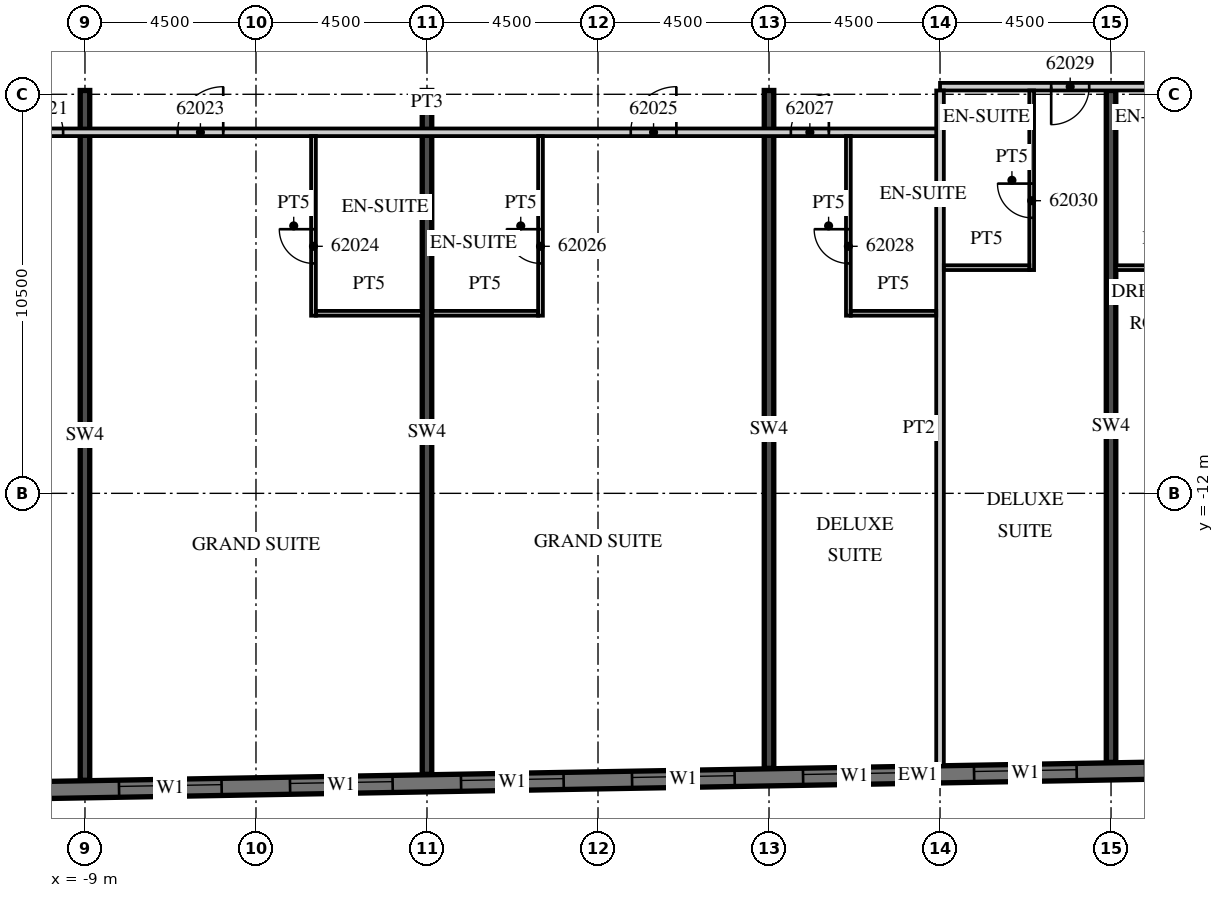
"""IFC4 building model, lengths in metres.
Left out: names, types, materials, properties, quantities, classifications, styles, units other than length and angle.
Written with IfcOpenShell. Run it as: python <this file> out.ifc"""

import sys

from ifc_helpers import new_model, si_unit, direction, frame, frame_2d, origin, place, context, subcontext, project, spatial, rectangle, extrude, element, fill, save


model = new_model("IFC4")
c1 = context("Model", 3, precision=1e-05, world=origin(), true_north=direction((0.0, 1.0)))
c2 = subcontext(c1, "Body", "Model", "MODEL_VIEW")
j1 = project(units=[si_unit("LENGTHUNIT", "METRE"), si_unit("PLANEANGLEUNIT", "RADIAN")], contexts=[c1])
p1 = place(None, origin())
s1 = spatial("IfcSite", under=j1, at=p1, CompositionType="ELEMENT")
p2 = place(p1, origin())
s2 = spatial("IfcBuilding", under=s1, at=p2, CompositionType="ELEMENT")
p3 = place(p2, frame((0.0, 0.0, 250.7)))
s3 = spatial("IfcBuildingStorey", under=s2, at=p3, CompositionType="ELEMENT", Elevation=250.7)
p4 = place(p3, frame((-9.0, -19.55, 0.0), z_axis=(0.0, 0.0, 1.0), x_axis=(0.0, 1.0, 0.0)))
e1 = element("IfcWall", 1, at=p4, inside=s3, PredefinedType="SHEAR", context=c2, shape_type="SweptSolid", body=[
    extrude(rectangle(XDim=18.15, YDim=0.25, at=frame_2d((9.075, 0.0))), origin(), (0.0, 0.0, 1.0), 3.3),
])
p5 = place(p3, frame((0.0, -19.393, 0.0), z_axis=(0.0, 0.0, 1.0), x_axis=(0.0, 1.0, 0.0)))
e2 = element("IfcWall", 2, at=p5, inside=s3, PredefinedType="SHEAR", context=c2, shape_type="SweptSolid", body=[
    extrude(rectangle(XDim=17.993, YDim=0.25, at=frame_2d((8.997, 0.0))), origin(), (0.0, 0.0, 1.0), 3.3),
])
p6 = place(p3, frame((9.0, -19.236, 0.0), z_axis=(0.0, 0.0, 1.0), x_axis=(0.0, 1.0, 0.0)))
e3 = element("IfcWall", 3, at=p6, inside=s3, PredefinedType="SHEAR", context=c2, shape_type="SweptSolid", body=[
    extrude(rectangle(XDim=17.836, YDim=0.25, at=frame_2d((8.918, 0.0))), origin(), (0.0, 0.0, 1.0), 3.3),
])
p7 = place(p3, frame((18.0, -19.079, 0.0), z_axis=(0.0, 0.0, 1.0), x_axis=(0.0, 1.0, 0.0)))
e4 = element("IfcWall", 4, at=p7, inside=s3, PredefinedType="SHEAR", context=c2, shape_type="SweptSolid", body=[
    extrude(rectangle(XDim=17.679, YDim=0.25, at=frame_2d((8.84, 0.0))), origin(), (0.0, 0.0, 1.0), 3.3),
])
p8 = place(p3, frame((-13.504, -19.866, 0.0), z_axis=(0.0, 0.0, 1.0), x_axis=(0.999847672978, 0.017453676992, 0.0)))
e5 = element("IfcWall", 5, at=p8, inside=s3, PredefinedType="SOLIDWALL", context=c2, shape_type="SweptSolid", body=[
    extrude(rectangle(XDim=52.86, YDim=0.45, at=frame_2d((26.43, 0.0))), origin(), (0.0, 0.0, 1.0), 3.02),
])
p9 = place(p8, frame((0.9, 0.0, 0.45)))
e6 = element("IfcOpeningElement", 6, at=p9, cuts=e5, PredefinedType="OPENING", context=c2, shape_type="SweptSolid", body=[
    extrude(rectangle(XDim=2.7, YDim=2.25, at=frame_2d((1.35, 1.125))), frame((0.0, 0.235, 0.0), z_axis=(0.0, -1.0, 0.0), x_axis=(1.0, 0.0, 0.0)), (0.0, 0.0, 1.0), 0.47),
])
p10 = place(p8, frame((5.401, 0.0, 0.45)))
e7 = element("IfcOpeningElement", 7, at=p10, cuts=e5, PredefinedType="OPENING", context=c2, shape_type="SweptSolid", body=[
    extrude(rectangle(XDim=2.7, YDim=2.25, at=frame_2d((1.35, 1.125))), frame((0.0, 0.235, 0.0), z_axis=(0.0, -1.0, 0.0), x_axis=(1.0, 0.0, 0.0)), (0.0, 0.0, 1.0), 0.47),
])
p11 = place(p8, frame((9.902, 0.0, 0.45)))
e8 = element("IfcOpeningElement", 8, at=p11, cuts=e5, PredefinedType="OPENING", context=c2, shape_type="SweptSolid", body=[
    extrude(rectangle(XDim=2.7, YDim=2.25, at=frame_2d((1.35, 1.125))), frame((0.0, 0.235, 0.0), z_axis=(0.0, -1.0, 0.0), x_axis=(1.0, 0.0, 0.0)), (0.0, 0.0, 1.0), 0.47),
])
p12 = place(p8, frame((14.402, 0.0, 0.45)))
e9 = element("IfcOpeningElement", 9, at=p12, cuts=e5, PredefinedType="OPENING", context=c2, shape_type="SweptSolid", body=[
    extrude(rectangle(XDim=2.7, YDim=2.25, at=frame_2d((1.35, 1.125))), frame((0.0, 0.235, 0.0), z_axis=(0.0, -1.0, 0.0), x_axis=(1.0, 0.0, 0.0)), (0.0, 0.0, 1.0), 0.47),
])
p13 = place(p8, frame((18.903, 0.0, 0.45)))
e10 = element("IfcOpeningElement", 10, at=p13, cuts=e5, PredefinedType="OPENING", context=c2, shape_type="SweptSolid", body=[
    extrude(rectangle(XDim=2.7, YDim=2.25, at=frame_2d((1.35, 1.125))), frame((0.0, 0.235, 0.0), z_axis=(0.0, -1.0, 0.0), x_axis=(1.0, 0.0, 0.0)), (0.0, 0.0, 1.0), 0.47),
])
p14 = place(p8, frame((23.404, 0.0, 0.45)))
e11 = element("IfcOpeningElement", 11, at=p14, cuts=e5, PredefinedType="OPENING", context=c2, shape_type="SweptSolid", body=[
    extrude(rectangle(XDim=2.7, YDim=2.25, at=frame_2d((1.35, 1.125))), frame((0.0, 0.235, 0.0), z_axis=(0.0, -1.0, 0.0), x_axis=(1.0, 0.0, 0.0)), (0.0, 0.0, 1.0), 0.47),
])
p15 = place(p8, frame((27.904, 0.0, 0.45)))
e12 = element("IfcOpeningElement", 12, at=p15, cuts=e5, PredefinedType="OPENING", context=c2, shape_type="SweptSolid", body=[
    extrude(rectangle(XDim=2.7, YDim=2.25, at=frame_2d((1.35, 1.125))), frame((0.0, 0.235, 0.0), z_axis=(0.0, -1.0, 0.0), x_axis=(1.0, 0.0, 0.0)), (0.0, 0.0, 1.0), 0.47),
])
p16 = place(p8, frame((32.405, 0.0, 0.45)))
e13 = element("IfcOpeningElement", 13, at=p16, cuts=e5, PredefinedType="OPENING", context=c2, shape_type="SweptSolid", body=[
    extrude(rectangle(XDim=2.7, YDim=2.25, at=frame_2d((1.35, 1.125))), frame((0.0, 0.235, 0.0), z_axis=(0.0, -1.0, 0.0), x_axis=(1.0, 0.0, 0.0)), (0.0, 0.0, 1.0), 0.47),
])
p17 = place(p8, frame((36.906, 0.0, 0.45)))
e14 = element("IfcOpeningElement", 14, at=p17, cuts=e5, PredefinedType="OPENING", context=c2, shape_type="SweptSolid", body=[
    extrude(rectangle(XDim=2.7, YDim=2.25, at=frame_2d((1.35, 1.125))), frame((0.0, 0.235, 0.0), z_axis=(0.0, -1.0, 0.0), x_axis=(1.0, 0.0, 0.0)), (0.0, 0.0, 1.0), 0.47),
])
p18 = place(p8, frame((41.406, 0.0, 0.45)))
e15 = element("IfcOpeningElement", 15, at=p18, cuts=e5, PredefinedType="OPENING", context=c2, shape_type="SweptSolid", body=[
    extrude(rectangle(XDim=2.7, YDim=2.25, at=frame_2d((1.35, 1.125))), frame((0.0, 0.235, 0.0), z_axis=(0.0, -1.0, 0.0), x_axis=(1.0, 0.0, 0.0)), (0.0, 0.0, 1.0), 0.47),
])
p19 = place(p8, frame((45.907, 0.0, 0.45)))
e16 = element("IfcOpeningElement", 16, at=p19, cuts=e5, PredefinedType="OPENING", context=c2, shape_type="SweptSolid", body=[
    extrude(rectangle(XDim=2.7, YDim=2.25, at=frame_2d((1.35, 1.125))), frame((0.0, 0.235, 0.0), z_axis=(0.0, -1.0, 0.0), x_axis=(1.0, 0.0, 0.0)), (0.0, 0.0, 1.0), 0.47),
])
p20 = place(p3, frame((-13.5, -2.5, 0.0), z_axis=(0.0, 0.0, 1.0), x_axis=(1.0, 0.0, 0.0)))
e17 = element("IfcWall", 17, at=p20, inside=s3, PredefinedType="PARTITIONING", context=c2, shape_type="SweptSolid", body=[
    extrude(rectangle(XDim=27.0, YDim=0.2, at=frame_2d((13.5, 0.0))), origin(), (0.0, 0.0, 1.0), 3.02),
])
p21 = place(p20, frame((2.925, 0.0, 0.0)))
e18 = element("IfcOpeningElement", 18, at=p21, cuts=e17, PredefinedType="OPENING", context=c2, shape_type="SweptSolid", body=[
    extrude(rectangle(XDim=1.0, YDim=2.1, at=frame_2d((0.5, 1.05))), frame((0.0, 0.11, 0.0), z_axis=(0.0, -1.0, 0.0), x_axis=(1.0, 0.0, 0.0)), (0.0, 0.0, 1.0), 0.22),
])
p22 = place(p20, frame((6.938, 0.0, 0.0)))
e19 = element("IfcOpeningElement", 19, at=p22, cuts=e17, PredefinedType="OPENING", context=c2, shape_type="SweptSolid", body=[
    extrude(rectangle(XDim=1.2, YDim=2.1, at=frame_2d((0.6, 1.05))), frame((0.0, 0.11, 0.0), z_axis=(0.0, -1.0, 0.0), x_axis=(1.0, 0.0, 0.0)), (0.0, 0.0, 1.0), 0.22),
])
p23 = place(p20, frame((18.862, 0.0, 0.0)))
e20 = element("IfcOpeningElement", 20, at=p23, cuts=e17, PredefinedType="OPENING", context=c2, shape_type="SweptSolid", body=[
    extrude(rectangle(XDim=1.2, YDim=2.1, at=frame_2d((0.6, 1.05))), frame((0.0, 0.11, 0.0), z_axis=(0.0, -1.0, 0.0), x_axis=(1.0, 0.0, 0.0)), (0.0, 0.0, 1.0), 0.22),
])
p24 = place(p20, frame((23.075, 0.0, 0.0)))
e21 = element("IfcOpeningElement", 21, at=p24, cuts=e17, PredefinedType="OPENING", context=c2, shape_type="SweptSolid", body=[
    extrude(rectangle(XDim=1.0, YDim=2.1, at=frame_2d((0.5, 1.05))), frame((0.0, 0.11, 0.0), z_axis=(0.0, -1.0, 0.0), x_axis=(1.0, 0.0, 0.0)), (0.0, 0.0, 1.0), 0.22),
])
p25 = place(p3, frame((13.5, -1.3, 0.0), z_axis=(0.0, 0.0, 1.0), x_axis=(1.0, 0.0, 0.0)))
e22 = element("IfcWall", 22, at=p25, inside=s3, PredefinedType="PARTITIONING", context=c2, shape_type="SweptSolid", body=[
    extrude(rectangle(XDim=29.091, YDim=0.2, at=frame_2d((14.545, 0.0))), origin(), (0.0, 0.0, 1.0), 3.02),
])
p26 = place(p25, frame((2.925, 0.0, 0.0)))
e23 = element("IfcOpeningElement", 23, at=p26, cuts=e22, PredefinedType="OPENING", context=c2, shape_type="SweptSolid", body=[
    extrude(rectangle(XDim=1.0, YDim=2.1, at=frame_2d((0.5, 1.05))), frame((0.0, 0.11, 0.0), z_axis=(0.0, -1.0, 0.0), x_axis=(1.0, 0.0, 0.0)), (0.0, 0.0, 1.0), 0.22),
])
p27 = place(p25, frame((7.45, 0.0, 0.0)))
e24 = element("IfcOpeningElement", 24, at=p27, cuts=e22, PredefinedType="OPENING", context=c2, shape_type="SweptSolid", body=[
    extrude(rectangle(XDim=1.0, YDim=2.1, at=frame_2d((0.5, 1.05))), frame((0.0, 0.11, 0.0), z_axis=(0.0, -1.0, 0.0), x_axis=(1.0, 0.0, 0.0)), (0.0, 0.0, 1.0), 0.22),
])
p28 = place(p25, frame((11.925, 0.0, 0.0)))
e25 = element("IfcOpeningElement", 25, at=p28, cuts=e22, PredefinedType="OPENING", context=c2, shape_type="SweptSolid", body=[
    extrude(rectangle(XDim=1.0, YDim=2.1, at=frame_2d((0.5, 1.05))), frame((0.0, 0.11, 0.0), z_axis=(0.0, -1.0, 0.0), x_axis=(1.0, 0.0, 0.0)), (0.0, 0.0, 1.0), 0.22),
])
p29 = place(p25, frame((15.938, 0.0, 0.0)))
e26 = element("IfcOpeningElement", 26, at=p29, cuts=e22, PredefinedType="OPENING", context=c2, shape_type="SweptSolid", body=[
    extrude(rectangle(XDim=1.2, YDim=2.1, at=frame_2d((0.6, 1.05))), frame((0.0, 0.11, 0.0), z_axis=(0.0, -1.0, 0.0), x_axis=(1.0, 0.0, 0.0)), (0.0, 0.0, 1.0), 0.22),
])
p30 = place(p25, frame((25.425, 0.0, 0.0)))
e27 = element("IfcOpeningElement", 27, at=p30, cuts=e22, PredefinedType="OPENING", context=c2, shape_type="SweptSolid", body=[
    extrude(rectangle(XDim=1.0, YDim=2.1, at=frame_2d((0.5, 1.05))), frame((0.0, 0.11, 0.0), z_axis=(0.0, -1.0, 0.0), x_axis=(1.0, 0.0, 0.0)), (0.0, 0.0, 1.0), 0.22),
])
p31 = place(p25, frame((27.611, 0.0, 0.0)))
e28 = element("IfcOpeningElement", 28, at=p31, cuts=e22, PredefinedType="OPENING", context=c2, shape_type="SweptSolid", body=[
    extrude(rectangle(XDim=1.0, YDim=2.4, at=frame_2d((0.5, 1.2))), frame((0.0, 0.11, 0.0), z_axis=(0.0, -1.0, 0.0), x_axis=(1.0, 0.0, 0.0)), (0.0, 0.0, 1.0), 0.22),
])
p32 = place(p3, frame((-2.987, -7.325, 0.0), z_axis=(0.0, 0.0, 1.0), x_axis=(0.0, 1.0, 0.0)))
e29 = element("IfcWall", 29, at=p32, inside=s3, PredefinedType="PARTITIONING", context=c2, shape_type="SweptSolid", body=[
    extrude(rectangle(XDim=4.725, YDim=0.125, at=frame_2d((2.362, 0.0))), origin(), (0.0, 0.0, 1.0), 3.02),
])
p33 = place(p32, frame((1.375, 0.0, 0.0)))
e30 = element("IfcOpeningElement", 30, at=p33, cuts=e29, PredefinedType="OPENING", context=c2, shape_type="SweptSolid", body=[
    extrude(rectangle(XDim=0.9, YDim=2.1, at=frame_2d((0.45, 1.05))), frame((0.0, 0.073, 0.0), z_axis=(0.0, -1.0, 0.0), x_axis=(1.0, 0.0, 0.0)), (0.0, 0.0, 1.0), 0.145),
])
p34 = place(p3, frame((-2.925, -7.262, 0.0), z_axis=(0.0, 0.0, 1.0), x_axis=(1.0, 0.0, 0.0)))
e31 = element("IfcWall", 31, at=p34, inside=s3, PredefinedType="PARTITIONING", context=c2, shape_type="SweptSolid", body=[
    extrude(rectangle(XDim=2.8, YDim=0.125, at=frame_2d((1.4, 0.0))), origin(), (0.0, 0.0, 1.0), 3.02),
])
p35 = place(p3, frame((2.987, -7.325, 0.0), z_axis=(0.0, 0.0, 1.0), x_axis=(0.0, 1.0, 0.0)))
e32 = element("IfcWall", 32, at=p35, inside=s3, PredefinedType="PARTITIONING", context=c2, shape_type="SweptSolid", body=[
    extrude(rectangle(XDim=4.725, YDim=0.125, at=frame_2d((2.362, 0.0))), origin(), (0.0, 0.0, 1.0), 3.02),
])
p36 = place(p35, frame((1.375, 0.0, 0.0)))
e33 = element("IfcOpeningElement", 33, at=p36, cuts=e32, PredefinedType="OPENING", context=c2, shape_type="SweptSolid", body=[
    extrude(rectangle(XDim=0.9, YDim=2.1, at=frame_2d((0.45, 1.05))), frame((0.0, 0.073, 0.0), z_axis=(0.0, -1.0, 0.0), x_axis=(1.0, 0.0, 0.0)), (0.0, 0.0, 1.0), 0.145),
])
p37 = place(p3, frame((0.125, -7.262, 0.0), z_axis=(0.0, 0.0, 1.0), x_axis=(1.0, 0.0, 0.0)))
e34 = element("IfcWall", 34, at=p37, inside=s3, PredefinedType="PARTITIONING", context=c2, shape_type="SweptSolid", body=[
    extrude(rectangle(XDim=2.8, YDim=0.125, at=frame_2d((1.4, 0.0))), origin(), (0.0, 0.0, 1.0), 3.02),
])
p38 = place(p3, frame((13.5, -19.17, 0.0), z_axis=(0.0, 0.0, 1.0), x_axis=(0.0, 1.0, 0.0)))
e35 = element("IfcWall", 35, at=p38, inside=s3, PredefinedType="PARTITIONING", context=c2, shape_type="SweptSolid", body=[
    extrude(rectangle(XDim=17.77, YDim=0.2, at=frame_2d((8.885, 0.0))), origin(), (0.0, 0.0, 1.0), 3.02),
])
p39 = place(p3, frame((11.088, -7.325, 0.0), z_axis=(0.0, 0.0, 1.0), x_axis=(0.0, 1.0, 0.0)))
e36 = element("IfcWall", 36, at=p39, inside=s3, PredefinedType="PARTITIONING", context=c2, shape_type="SweptSolid", body=[
    extrude(rectangle(XDim=4.725, YDim=0.125, at=frame_2d((2.362, 0.0))), origin(), (0.0, 0.0, 1.0), 3.02),
])
p40 = place(p39, frame((1.375, 0.0, 0.0)))
e37 = element("IfcOpeningElement", 37, at=p40, cuts=e36, PredefinedType="OPENING", context=c2, shape_type="SweptSolid", body=[
    extrude(rectangle(XDim=0.9, YDim=2.1, at=frame_2d((0.45, 1.05))), frame((0.0, 0.073, 0.0), z_axis=(0.0, -1.0, 0.0), x_axis=(1.0, 0.0, 0.0)), (0.0, 0.0, 1.0), 0.145),
])
p41 = place(p3, frame((11.15, -7.262, 0.0), z_axis=(0.0, 0.0, 1.0), x_axis=(1.0, 0.0, 0.0)))
e38 = element("IfcWall", 38, at=p41, inside=s3, PredefinedType="PARTITIONING", context=c2, shape_type="SweptSolid", body=[
    extrude(rectangle(XDim=2.25, YDim=0.125, at=frame_2d((1.125, 0.0))), origin(), (0.0, 0.0, 1.0), 3.02),
])
p42 = place(p3, frame((15.912, -6.125, 0.0), z_axis=(0.0, 0.0, 1.0), x_axis=(0.0, 1.0, 0.0)))
e39 = element("IfcWall", 39, at=p42, inside=s3, PredefinedType="PARTITIONING", context=c2, shape_type="SweptSolid", body=[
    extrude(rectangle(XDim=4.725, YDim=0.125, at=frame_2d((2.363, 0.0))), origin(), (0.0, 0.0, 1.0), 3.02),
])
p43 = place(p42, frame((1.375, 0.0, 0.0)))
e40 = element("IfcOpeningElement", 40, at=p43, cuts=e39, PredefinedType="OPENING", context=c2, shape_type="SweptSolid", body=[
    extrude(rectangle(XDim=0.9, YDim=2.1, at=frame_2d((0.45, 1.05))), frame((0.0, 0.073, 0.0), z_axis=(0.0, -1.0, 0.0), x_axis=(1.0, 0.0, 0.0)), (0.0, 0.0, 1.0), 0.145),
])
for number, where, z_axis, x_axis in (
    (41, (13.6, -6.062, 0.0), (0.0, 0.0, 1.0), (1.0, 0.0, 0.0)),
    (42, (18.125, -6.062, 0.0), (0.0, 0.0, 1.0), (1.0, 0.0, 0.0)),
):
    element("IfcWall", number, at=place(p3, frame(where, z_axis=z_axis, x_axis=x_axis)), inside=s3, PredefinedType="PARTITIONING", context=c2, shape_type="SweptSolid", body=[
        extrude(rectangle(XDim=2.25, YDim=0.125, at=frame_2d((1.125, 0.0))), origin(), (0.0, 0.0, 1.0), 3.02),
    ])
p44 = place(p10, origin())
e43 = element("IfcWindow", 43, at=p44, inside=s3, PartitioningType="SINGLE_PANEL", PredefinedType="WINDOW", context=c2, shape_type="SweptSolid", body=[
    extrude(rectangle(XDim=2.7, YDim=2.25, at=frame_2d((1.35, 1.125))), frame((0.0, 0.09, 0.0), z_axis=(0.0, -1.0, 0.0), x_axis=(1.0, 0.0, 0.0)), (0.0, 0.0, 1.0), 0.06),
])
fill(e7, e43)
p45 = place(p11, origin())
e44 = element("IfcWindow", 44, at=p45, inside=s3, PartitioningType="SINGLE_PANEL", PredefinedType="WINDOW", context=c2, shape_type="SweptSolid", body=[
    extrude(rectangle(XDim=2.7, YDim=2.25, at=frame_2d((1.35, 1.125))), frame((0.0, 0.09, 0.0), z_axis=(0.0, -1.0, 0.0), x_axis=(1.0, 0.0, 0.0)), (0.0, 0.0, 1.0), 0.06),
])
fill(e8, e44)
p46 = place(p12, origin())
e45 = element("IfcWindow", 45, at=p46, inside=s3, PartitioningType="SINGLE_PANEL", PredefinedType="WINDOW", context=c2, shape_type="SweptSolid", body=[
    extrude(rectangle(XDim=2.7, YDim=2.25, at=frame_2d((1.35, 1.125))), frame((0.0, 0.09, 0.0), z_axis=(0.0, -1.0, 0.0), x_axis=(1.0, 0.0, 0.0)), (0.0, 0.0, 1.0), 0.06),
])
fill(e9, e45)
p47 = place(p13, origin())
e46 = element("IfcWindow", 46, at=p47, inside=s3, PartitioningType="SINGLE_PANEL", PredefinedType="WINDOW", context=c2, shape_type="SweptSolid", body=[
    extrude(rectangle(XDim=2.7, YDim=2.25, at=frame_2d((1.35, 1.125))), frame((0.0, 0.09, 0.0), z_axis=(0.0, -1.0, 0.0), x_axis=(1.0, 0.0, 0.0)), (0.0, 0.0, 1.0), 0.06),
])
fill(e10, e46)
p48 = place(p14, origin())
e47 = element("IfcWindow", 47, at=p48, inside=s3, PartitioningType="SINGLE_PANEL", PredefinedType="WINDOW", context=c2, shape_type="SweptSolid", body=[
    extrude(rectangle(XDim=2.7, YDim=2.25, at=frame_2d((1.35, 1.125))), frame((0.0, 0.09, 0.0), z_axis=(0.0, -1.0, 0.0), x_axis=(1.0, 0.0, 0.0)), (0.0, 0.0, 1.0), 0.06),
])
fill(e11, e47)
p49 = place(p15, origin())
e48 = element("IfcWindow", 48, at=p49, inside=s3, PartitioningType="SINGLE_PANEL", PredefinedType="WINDOW", context=c2, shape_type="SweptSolid", body=[
    extrude(rectangle(XDim=2.7, YDim=2.25, at=frame_2d((1.35, 1.125))), frame((0.0, 0.09, 0.0), z_axis=(0.0, -1.0, 0.0), x_axis=(1.0, 0.0, 0.0)), (0.0, 0.0, 1.0), 0.06),
])
fill(e12, e48)
p50 = place(p21, origin())
e49 = element("IfcDoor", 49, at=p50, inside=s3, OperationType="SINGLE_SWING_LEFT", PredefinedType="DOOR", context=c2, shape_type="SweptSolid", body=[
    extrude(rectangle(XDim=1.0, YDim=2.1, at=frame_2d((0.5, 1.05))), frame((0.0, 0.025, 0.0), z_axis=(0.0, -1.0, 0.0), x_axis=(1.0, 0.0, 0.0)), (0.0, 0.0, 1.0), 0.05),
])
fill(e18, e49)
p51 = place(p22, origin())
e50 = element("IfcDoor", 50, at=p51, inside=s3, OperationType="SINGLE_SWING_RIGHT", PredefinedType="DOOR", context=c2, shape_type="SweptSolid", body=[
    extrude(rectangle(XDim=1.2, YDim=2.1, at=frame_2d((0.6, 1.05))), frame((0.0, 0.025, 0.0), z_axis=(0.0, -1.0, 0.0), x_axis=(1.0, 0.0, 0.0)), (0.0, 0.0, 1.0), 0.05),
])
fill(e19, e50)
p52 = place(p33, origin())
e51 = element("IfcDoor", 51, at=p52, inside=s3, OperationType="SINGLE_SWING_RIGHT", PredefinedType="DOOR", context=c2, shape_type="SweptSolid", body=[
    extrude(rectangle(XDim=0.9, YDim=2.1, at=frame_2d((0.45, 1.05))), frame((0.0, 0.025, 0.0), z_axis=(0.0, -1.0, 0.0), x_axis=(1.0, 0.0, 0.0)), (0.0, 0.0, 1.0), 0.05),
])
fill(e30, e51)
p53 = place(p23, origin())
e52 = element("IfcDoor", 52, at=p53, inside=s3, OperationType="SINGLE_SWING_RIGHT", PredefinedType="DOOR", context=c2, shape_type="SweptSolid", body=[
    extrude(rectangle(XDim=1.2, YDim=2.1, at=frame_2d((0.6, 1.05))), frame((0.0, 0.025, 0.0), z_axis=(0.0, -1.0, 0.0), x_axis=(1.0, 0.0, 0.0)), (0.0, 0.0, 1.0), 0.05),
])
fill(e20, e52)
p54 = place(p36, origin())
e53 = element("IfcDoor", 53, at=p54, inside=s3, OperationType="SINGLE_SWING_RIGHT", PredefinedType="DOOR", context=c2, shape_type="SweptSolid", body=[
    extrude(rectangle(XDim=0.9, YDim=2.1, at=frame_2d((0.45, 1.05))), frame((0.0, 0.025, 0.0), z_axis=(0.0, -1.0, 0.0), x_axis=(1.0, 0.0, 0.0)), (0.0, 0.0, 1.0), 0.05),
])
fill(e33, e53)
p55 = place(p24, origin())
e54 = element("IfcDoor", 54, at=p55, inside=s3, OperationType="SINGLE_SWING_RIGHT", PredefinedType="DOOR", context=c2, shape_type="SweptSolid", body=[
    extrude(rectangle(XDim=1.0, YDim=2.1, at=frame_2d((0.5, 1.05))), frame((0.0, 0.025, 0.0), z_axis=(0.0, -1.0, 0.0), x_axis=(1.0, 0.0, 0.0)), (0.0, 0.0, 1.0), 0.05),
])
fill(e21, e54)
p56 = place(p40, origin())
e55 = element("IfcDoor", 55, at=p56, inside=s3, OperationType="SINGLE_SWING_RIGHT", PredefinedType="DOOR", context=c2, shape_type="SweptSolid", body=[
    extrude(rectangle(XDim=0.9, YDim=2.1, at=frame_2d((0.45, 1.05))), frame((0.0, 0.025, 0.0), z_axis=(0.0, -1.0, 0.0), x_axis=(1.0, 0.0, 0.0)), (0.0, 0.0, 1.0), 0.05),
])
fill(e37, e55)
p57 = place(p26, origin())
e56 = element("IfcDoor", 56, at=p57, inside=s3, OperationType="SINGLE_SWING_LEFT", PredefinedType="DOOR", context=c2, shape_type="SweptSolid", body=[
    extrude(rectangle(XDim=1.0, YDim=2.1, at=frame_2d((0.5, 1.05))), frame((0.0, 0.025, 0.0), z_axis=(0.0, -1.0, 0.0), x_axis=(1.0, 0.0, 0.0)), (0.0, 0.0, 1.0), 0.05),
])
fill(e23, e56)
p58 = place(p43, origin())
e57 = element("IfcDoor", 57, at=p58, inside=s3, OperationType="SINGLE_SWING_RIGHT", PredefinedType="DOOR", context=c2, shape_type="SweptSolid", body=[
    extrude(rectangle(XDim=0.9, YDim=2.1, at=frame_2d((0.45, 1.05))), frame((0.0, 0.025, 0.0), z_axis=(0.0, -1.0, 0.0), x_axis=(1.0, 0.0, 0.0)), (0.0, 0.0, 1.0), 0.05),
])
fill(e40, e57)
save(model, sys.argv[1])
